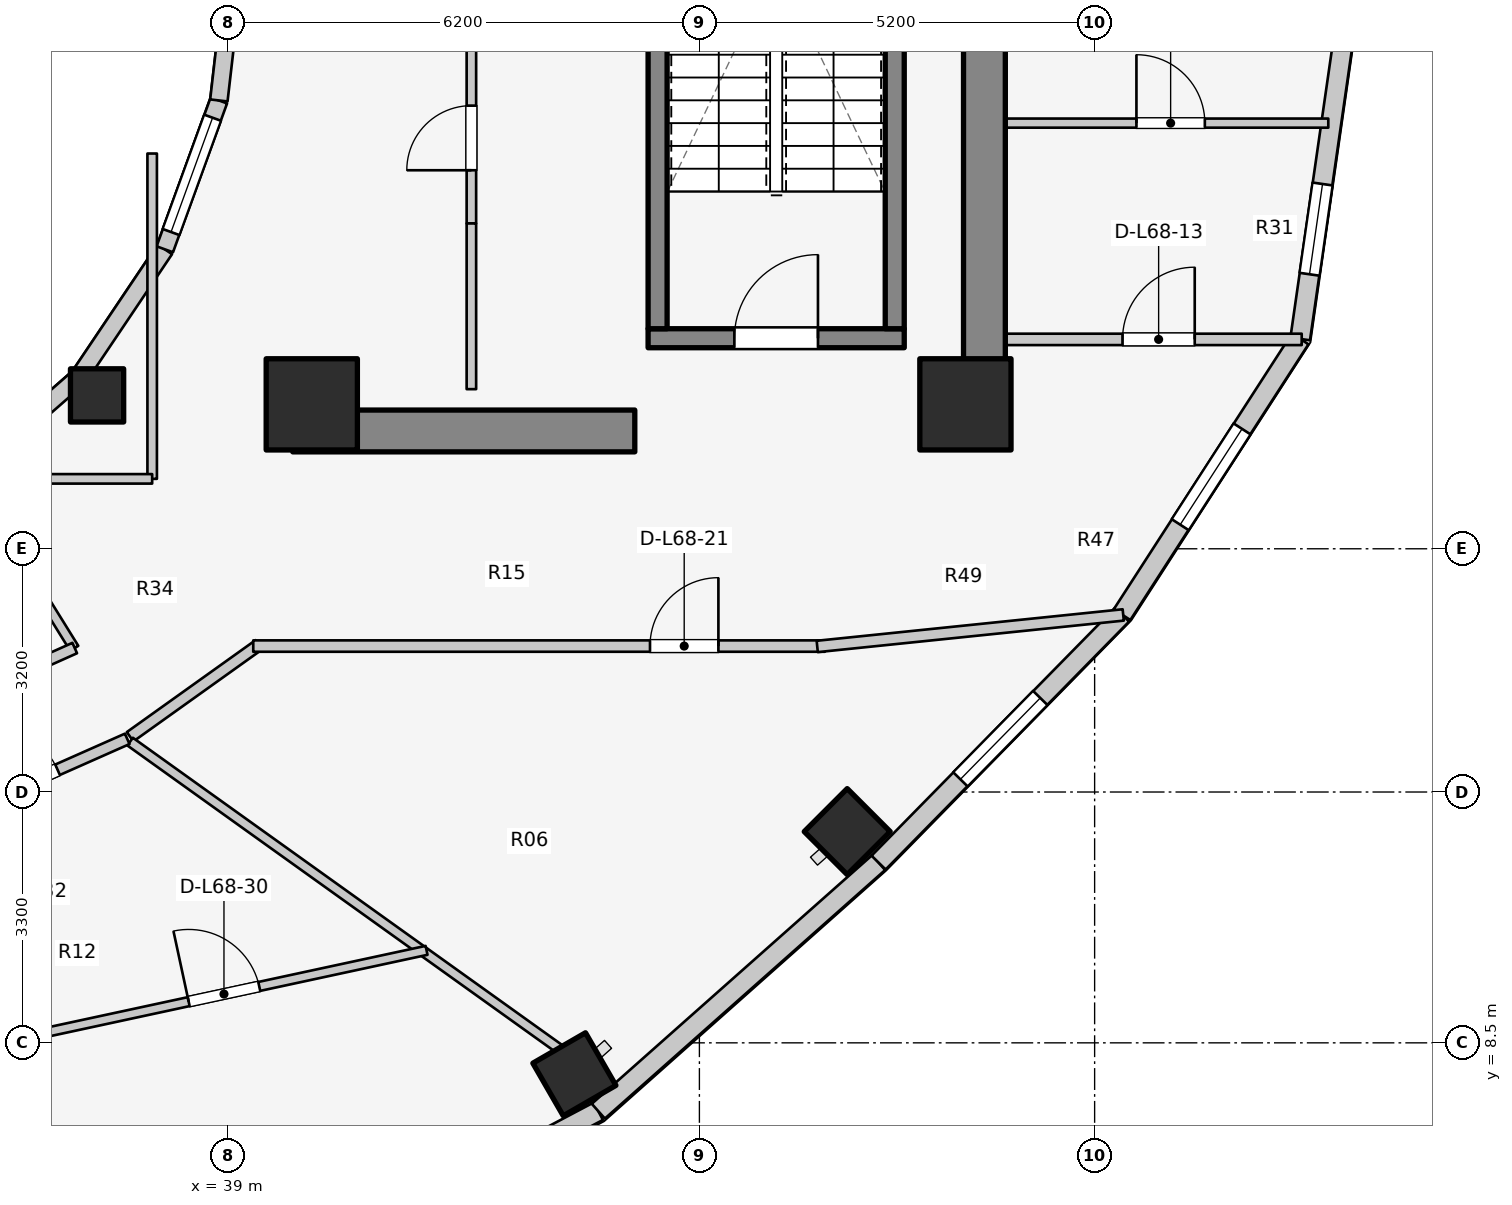
"""IFC4 building model, lengths in metres.
Left out: names, types, materials, properties, quantities, classifications, styles, units other than length and angle.
Written with IfcOpenShell. Run it as: python <this file> out.ifc"""

import sys

from ifc_helpers import new_model, si_unit, direction, frame, frame_2d, origin, origin_2d, place, context, subcontext, project, spatial, rectangle, extrude, element, fill, save


model = new_model("IFC4")
c1 = context("Model", 3, precision=1e-05, world=origin(), true_north=direction((0.0, 1.0)))
c2 = subcontext(c1, "Body", "Model", "MODEL_VIEW")
j1 = project(units=[si_unit("LENGTHUNIT", "METRE"), si_unit("PLANEANGLEUNIT", "RADIAN")], contexts=[c1])
p1 = place(None, origin())
s1 = spatial("IfcSite", under=j1, at=p1, CompositionType="ELEMENT")
p2 = place(p1, origin())
s2 = spatial("IfcBuilding", under=s1, at=p2, CompositionType="ELEMENT")
p3 = place(p2, frame((0.0, 0.0, 223.3)))
s3 = spatial("IfcBuildingStorey", under=s2, at=p3, CompositionType="ELEMENT", Elevation=223.3)
p4 = place(p3, frame((48.95, 17.05, 0.0), z_axis=(0.0, 0.0, 1.0), x_axis=(0.0, 1.0, 0.0)))
e1 = element("IfcWall", 1, at=p4, inside=s3, PredefinedType="SHEAR", context=c2, shape_type="SweptSolid", body=[
    extrude(rectangle(XDim=12.8, YDim=0.55, at=frame_2d((6.4, 0.0))), origin(), (0.0, 0.0, 1.0), 3.1),
])
p5 = place(p3, frame((39.85, 16.55, 0.0), z_axis=(0.0, 0.0, 1.0), x_axis=(1.0, 0.0, 0.0)))
e2 = element("IfcWall", 2, at=p5, inside=s3, PredefinedType="SHEAR", context=c2, shape_type="SweptSolid", body=[
    extrude(rectangle(XDim=4.5, YDim=0.55, at=frame_2d((2.25, 0.0))), origin(), (0.0, 0.0, 1.0), 3.1),
])
p6 = place(p3, frame((44.525, 17.77, 0.0), z_axis=(0.0, 0.0, 1.0), x_axis=(1.0, 0.0, 0.0)))
e3 = element("IfcWall", 3, at=p6, inside=s3, PredefinedType="SOLIDWALL", context=c2, shape_type="SweptSolid", body=[
    extrude(rectangle(XDim=3.37, YDim=0.25, at=frame_2d((1.685, 0.0))), origin(), (0.0, 0.0, 1.0), 3.1),
])
p7 = place(p6, frame((1.135, 0.0, 0.0)))
e4 = element("IfcOpeningElement", 4, at=p7, cuts=e3, PredefinedType="OPENING", context=c2, shape_type="SweptSolid", body=[
    extrude(rectangle(XDim=1.1, YDim=2.1, at=frame_2d((0.55, 1.05))), frame((0.0, 0.135, 0.0), z_axis=(0.0, -1.0, 0.0), x_axis=(1.0, 0.0, 0.0)), (0.0, 0.0, 1.0), 0.27),
])
for number, where, z_axis, x_axis in (
    (5, (44.65, 17.895, 0.0), (0.0, 0.0, 1.0), (0.0, 1.0, 0.0)),
    (6, (47.77, 17.895, 0.0), (0.0, 0.0, 1.0), (0.0, 1.0, 0.0)),
):
    element("IfcWall", number, at=place(p3, frame(where, z_axis=z_axis, x_axis=x_axis)), inside=s3, PredefinedType="SOLIDWALL", context=c2, shape_type="SweptSolid", body=[
        extrude(rectangle(XDim=7.81, YDim=0.25, at=frame_2d((3.905, 0.0))), origin(), (0.0, 0.0, 1.0), 3.1),
    ])
for number, where, z_axis, x_axis in (
    (7, (40.1, 16.9, 0.0), (0.0, 0.0, 1.0), (1.0, 0.0, 0.0)),
    (8, (48.7, 16.9, 0.0), (0.0, 0.0, 1.0), (1.0, 0.0, 0.0)),
):
    element("IfcColumn", number, at=place(p3, frame(where, z_axis=z_axis, x_axis=x_axis)), inside=s3, PredefinedType="COLUMN", context=c2, shape_type="SweptSolid", body=[
        extrude(rectangle(XDim=1.2, YDim=1.2, at=origin_2d()), origin(), (0.0, 0.0, 1.0), 3.1),
    ])
p8 = place(p3, frame((43.555, 8.086, 0.0), z_axis=(0.0, 0.0, 1.0), x_axis=(0.5, -0.866025403784, 0.0)))
e9 = element("IfcColumn", 9, at=p8, inside=s3, PredefinedType="COLUMN", context=c2, shape_type="SweptSolid", body=[
    extrude(rectangle(XDim=0.8, YDim=0.8, at=origin_2d()), origin(), (0.0, 0.0, 1.0), 3.1),
])
p9 = place(p3, frame((37.275, 17.018, 0.0), z_axis=(0.0, 0.0, 1.0), x_axis=(1.0, 0.0, 0.0)))
e10 = element("IfcColumn", 10, at=p9, inside=s3, PredefinedType="COLUMN", context=c2, shape_type="SweptSolid", body=[
    extrude(rectangle(XDim=0.7, YDim=0.7, at=origin_2d()), origin(), (0.0, 0.0, 1.0), 3.1),
])
p10 = place(p3, frame((47.145, 11.279, 0.0), z_axis=(0.0, 0.0, 1.0), x_axis=(0.707106781187, -0.707106781187, 0.0)))
e11 = element("IfcColumn", 11, at=p10, inside=s3, PredefinedType="COLUMN", context=c2, shape_type="SweptSolid", body=[
    extrude(rectangle(XDim=0.8, YDim=0.8, at=origin_2d()), origin(), (0.0, 0.0, 1.0), 3.1),
])
p11 = place(p3, frame((35.56, 15.968, 0.0), z_axis=(0.0, 0.0, 1.0), x_axis=(0.752576694707, 0.658504607869, 0.0)))
e12 = element("IfcWall", 12, at=p11, inside=s3, PredefinedType="STANDARD", context=c2, shape_type="SweptSolid", body=[
    extrude(rectangle(XDim=1.959, YDim=0.23, at=frame_2d((0.98, 0.0))), origin(), (0.0, 0.0, 1.0), 2.16),
])
p12 = place(p3, frame((37.035, 17.258, 0.0), z_axis=(0.0, 0.0, 1.0), x_axis=(0.558197800898, 0.829707909492, 0.0)))
e13 = element("IfcWall", 13, at=p12, inside=s3, PredefinedType="STANDARD", context=c2, shape_type="SweptSolid", body=[
    extrude(rectangle(XDim=2.027, YDim=0.23, at=frame_2d((1.013, 0.0))), origin(), (0.0, 0.0, 1.0), 2.16),
])
p13 = place(p3, frame((38.166, 18.94, 0.0), z_axis=(0.0, 0.0, 1.0), x_axis=(0.341423187295, 0.93990968033, 0.0)))
e14 = element("IfcWall", 14, at=p13, inside=s3, PredefinedType="STANDARD", context=c2, shape_type="SweptSolid", body=[
    extrude(rectangle(XDim=2.084, YDim=0.23, at=frame_2d((1.042, 0.0))), origin(), (0.0, 0.0, 1.0), 2.84),
])
p14 = place(p13, frame((0.242, 0.0, 0.85)))
e15 = element("IfcOpeningElement", 15, at=p14, cuts=e14, PredefinedType="OPENING", context=c2, shape_type="SweptSolid", body=[
    extrude(rectangle(XDim=1.6, YDim=1.65, at=frame_2d((0.8, 0.825))), frame((0.0, 0.125, 0.0), z_axis=(0.0, -1.0, 0.0), x_axis=(1.0, 0.0, 0.0)), (0.0, 0.0, 1.0), 0.25),
])
p15 = place(p3, frame((38.877, 20.898, 0.0), z_axis=(0.0, 0.0, 1.0), x_axis=(0.114711713601, 0.993398823617, 0.0)))
e16 = element("IfcWall", 16, at=p15, inside=s3, PredefinedType="STANDARD", context=c2, shape_type="SweptSolid", body=[
    extrude(rectangle(XDim=2.115, YDim=0.23, at=frame_2d((1.058, 0.0))), origin(), (0.0, 0.0, 1.0), 2.84),
])
p16 = place(p3, frame((39.043, 5.048, 0.0), z_axis=(0.0, 0.0, 1.0), x_axis=(0.884000981341, 0.46748504253, 0.0)))
e17 = element("IfcWall", 17, at=p16, inside=s3, PredefinedType="STANDARD", context=c2, shape_type="SweptSolid", body=[
    extrude(rectangle(XDim=5.46, YDim=0.26, at=frame_2d((2.73, 0.0))), origin(), (0.0, 0.0, 1.0), 2.85),
])
p17 = place(p16, frame((1.53, 0.0, 0.75)))
e18 = element("IfcOpeningElement", 18, at=p17, cuts=e17, PredefinedType="OPENING", context=c2, shape_type="SweptSolid", body=[
    extrude(rectangle(XDim=2.4, YDim=1.7, at=frame_2d((1.2, 0.85))), frame((0.0, 0.14, 0.0), z_axis=(0.0, -1.0, 0.0), x_axis=(1.0, 0.0, 0.0)), (0.0, 0.0, 1.0), 0.28),
])
p18 = place(p3, frame((43.87, 7.601, 0.0), z_axis=(0.0, 0.0, 1.0), x_axis=(0.748165854006, 0.663511759428, 0.0)))
e19 = element("IfcWall", 19, at=p18, inside=s3, PredefinedType="STANDARD", context=c2, shape_type="SweptSolid", body=[
    extrude(rectangle(XDim=4.929, YDim=0.26, at=frame_2d((2.464, 0.0))), origin(), (0.0, 0.0, 1.0), 2.85),
])
p19 = place(p3, frame((47.558, 10.871, 0.0), z_axis=(0.0, 0.0, 1.0), x_axis=(0.700642973333, 0.713512034881, 0.0)))
e20 = element("IfcWall", 20, at=p19, inside=s3, PredefinedType="STANDARD", context=c2, shape_type="SweptSolid", body=[
    extrude(rectangle(XDim=4.572, YDim=0.26, at=frame_2d((2.286, 0.0))), origin(), (0.0, 0.0, 1.0), 2.85),
])
p20 = place(p19, frame((1.536, 0.0, 0.75)))
e21 = element("IfcOpeningElement", 21, at=p20, cuts=e20, PredefinedType="OPENING", context=c2, shape_type="SweptSolid", body=[
    extrude(rectangle(XDim=1.5, YDim=1.6, at=frame_2d((0.75, 0.8))), frame((0.0, 0.14, 0.0), z_axis=(0.0, -1.0, 0.0), x_axis=(1.0, 0.0, 0.0)), (0.0, 0.0, 1.0), 0.28),
])
p21 = place(p3, frame((50.761, 14.133, 0.0), z_axis=(0.0, 0.0, 1.0), x_axis=(0.542641766008, 0.839964233634, 0.0)))
e22 = element("IfcWall", 22, at=p21, inside=s3, PredefinedType="STANDARD", context=c2, shape_type="SweptSolid", body=[
    extrude(rectangle(XDim=4.319, YDim=0.26, at=frame_2d((2.16, 0.0))), origin(), (0.0, 0.0, 1.0), 2.85),
])
p22 = place(p21, frame((1.41, 0.0, 0.75)))
e23 = element("IfcOpeningElement", 23, at=p22, cuts=e22, PredefinedType="OPENING", context=c2, shape_type="SweptSolid", body=[
    extrude(rectangle(XDim=1.5, YDim=1.6, at=frame_2d((0.75, 0.8))), frame((0.0, 0.14, 0.0), z_axis=(0.0, -1.0, 0.0), x_axis=(1.0, 0.0, 0.0)), (0.0, 0.0, 1.0), 0.28),
])
p23 = place(p3, frame((53.105, 17.761, 0.0), z_axis=(0.0, 0.0, 1.0), x_axis=(0.142712754019, 0.989764148593, 0.0)))
e24 = element("IfcWall", 24, at=p23, inside=s3, PredefinedType="STANDARD", context=c2, shape_type="SweptSolid", body=[
    extrude(rectangle(XDim=5.293, YDim=0.26, at=frame_2d((2.646, 0.0))), origin(), (0.0, 0.0, 1.0), 2.85),
])
p24 = place(p23, frame((0.859, 0.0, 0.75)))
e25 = element("IfcOpeningElement", 25, at=p24, cuts=e24, PredefinedType="OPENING", context=c2, shape_type="SweptSolid", body=[
    extrude(rectangle(XDim=1.2, YDim=1.5, at=frame_2d((0.6, 0.75))), frame((0.0, 0.14, 0.0), z_axis=(0.0, -1.0, 0.0), x_axis=(1.0, 0.0, 0.0)), (0.0, 0.0, 1.0), 0.28),
])
p25 = place(p3, frame((42.2, 19.28, 0.0), z_axis=(0.0, 0.0, 1.0), x_axis=(0.0, 1.0, 0.0)))
e26 = element("IfcWall", 26, at=p25, inside=s3, PredefinedType="PARTITIONING", context=c2, shape_type="SweptSolid", body=[
    extrude(rectangle(XDim=2.4, YDim=0.125, at=frame_2d((1.2, 0.0))), origin(), (0.0, 0.0, 1.0), 2.855),
])
p26 = place(p25, frame((0.7, 0.0, 0.0)))
e27 = element("IfcOpeningElement", 27, at=p26, cuts=e26, PredefinedType="OPENING", context=c2, shape_type="SweptSolid", body=[
    extrude(rectangle(XDim=0.85, YDim=2.05, at=frame_2d((0.425, 1.025))), frame((0.0, 0.073, 0.0), z_axis=(0.0, -1.0, 0.0), x_axis=(1.0, 0.0, 0.0)), (0.0, 0.0, 1.0), 0.145),
])
p27 = place(p3, frame((42.2, 17.1, 0.0), z_axis=(0.0, 0.0, 1.0), x_axis=(0.0, 1.0, 0.0)))
e28 = element("IfcWall", 28, at=p27, inside=s3, PredefinedType="PARTITIONING", context=c2, shape_type="SweptSolid", body=[
    extrude(rectangle(XDim=2.18, YDim=0.125, at=frame_2d((1.09, 0.0))), origin(), (0.0, 0.0, 1.0), 2.855),
])
p28 = place(p3, frame((35.55, 15.985, 0.0), z_axis=(0.0, 0.0, 1.0), x_axis=(0.527527080983, -0.849538215049, 0.0)))
e29 = element("IfcWall", 29, at=p28, inside=s3, PredefinedType="PARTITIONING", context=c2, shape_type="SweptSolid", body=[
    extrude(rectangle(XDim=2.701, YDim=0.125, at=frame_2d((1.351, 0.0))), origin(), (0.0, 0.0, 1.0), 2.376),
])
p29 = place(p3, frame((34.573, 12.616, 0.0), z_axis=(0.0, 0.0, 1.0), x_axis=(0.912628408652, 0.408790151203, 0.0)))
e30 = element("IfcWall", 30, at=p29, inside=s3, PredefinedType="PARTITIONING", context=c2, shape_type="SweptSolid", body=[
    extrude(rectangle(XDim=2.638, YDim=0.15, at=frame_2d((1.319, 0.0))), origin(), (0.0, 0.0, 1.0), 2.376),
])
p30 = place(p29, frame((0.844, 0.0, 0.0)))
e31 = element("IfcOpeningElement", 31, at=p30, cuts=e30, PredefinedType="OPENING", context=c2, shape_type="SweptSolid", body=[
    extrude(rectangle(XDim=0.95, YDim=2.1, at=frame_2d((0.475, 1.05))), frame((0.0, 0.085, 0.0), z_axis=(0.0, -1.0, 0.0), x_axis=(1.0, 0.0, 0.0)), (0.0, 0.0, 1.0), 0.17),
])
p31 = place(p3, frame((38.0, 15.92, 0.0), z_axis=(0.0, 0.0, 1.0), x_axis=(0.0, 1.0, 0.0)))
e32 = element("IfcWall", 32, at=p31, inside=s3, PredefinedType="PARTITIONING", context=c2, shape_type="SweptSolid", body=[
    extrude(rectangle(XDim=4.28, YDim=0.125, at=frame_2d((2.14, 0.0))), origin(), (0.0, 0.0, 1.0), 2.232),
])
p32 = place(p3, frame((35.4, 15.92, 0.0), z_axis=(0.0, 0.0, 1.0), x_axis=(1.0, 0.0, 0.0)))
e33 = element("IfcWall", 33, at=p32, inside=s3, PredefinedType="PARTITIONING", context=c2, shape_type="SweptSolid", body=[
    extrude(rectangle(XDim=2.6, YDim=0.125, at=frame_2d((1.3, 0.0))), origin(), (0.0, 0.0, 1.0), 2.232),
])
p33 = place(p3, frame((48.95, 17.755, 0.0), z_axis=(0.0, 0.0, 1.0), x_axis=(1.0, 0.0, 0.0)))
e34 = element("IfcWall", 34, at=p33, inside=s3, PredefinedType="PARTITIONING", context=c2, shape_type="SweptSolid", body=[
    extrude(rectangle(XDim=4.175, YDim=0.15, at=frame_2d((2.087, 0.0))), origin(), (0.0, 0.0, 1.0), 2.855),
])
p34 = place(p33, frame((1.817, 0.0, 0.0)))
e35 = element("IfcOpeningElement", 35, at=p34, cuts=e34, PredefinedType="OPENING", context=c2, shape_type="SweptSolid", body=[
    extrude(rectangle(XDim=0.95, YDim=2.1, at=frame_2d((0.475, 1.05))), frame((0.0, 0.085, 0.0), z_axis=(0.0, -1.0, 0.0), x_axis=(1.0, 0.0, 0.0)), (0.0, 0.0, 1.0), 0.17),
])
p35 = place(p3, frame((48.95, 20.6, 0.0), z_axis=(0.0, 0.0, 1.0), x_axis=(1.0, 0.0, 0.0)))
e36 = element("IfcWall", 36, at=p35, inside=s3, PredefinedType="MOVABLE", context=c2, shape_type="SweptSolid", body=[
    extrude(rectangle(XDim=4.524, YDim=0.12, at=frame_2d((2.262, 0.0))), origin(), (0.0, 0.0, 1.0), 2.855),
])
p36 = place(p35, frame((2.0, 0.0, 0.0)))
e37 = element("IfcOpeningElement", 37, at=p36, cuts=e36, PredefinedType="OPENING", context=c2, shape_type="SweptSolid", body=[
    extrude(rectangle(XDim=0.9, YDim=2.1, at=frame_2d((0.45, 1.05))), frame((0.0, 0.07, 0.0), z_axis=(0.0, -1.0, 0.0), x_axis=(1.0, 0.0, 0.0)), (0.0, 0.0, 1.0), 0.14),
])
p37 = place(p3, frame((37.71, 12.527, 0.0), z_axis=(0.0, 0.0, 1.0), x_axis=(0.813780999276, 0.581171648669, 0.0)))
e38 = element("IfcWall", 38, at=p37, inside=s3, PredefinedType="PARTITIONING", context=c2, shape_type="SweptSolid", body=[
    extrude(rectangle(XDim=2.082, YDim=0.15, at=frame_2d((1.041, 0.0))), origin(), (0.0, 0.0, 1.0), 2.376),
])
p38 = place(p3, frame((39.33, 13.72, 0.0), z_axis=(0.0, 0.0, 1.0), x_axis=(1.0, 0.0, 0.0)))
e39 = element("IfcWall", 39, at=p38, inside=s3, PredefinedType="PARTITIONING", context=c2, shape_type="SweptSolid", body=[
    extrude(rectangle(XDim=7.52, YDim=0.15, at=frame_2d((3.76, 0.0))), origin(), (0.0, 0.0, 1.0), 2.376),
])
p39 = place(p38, frame((5.22, 0.0, 0.0)))
e40 = element("IfcOpeningElement", 40, at=p39, cuts=e39, PredefinedType="OPENING", context=c2, shape_type="SweptSolid", body=[
    extrude(rectangle(XDim=0.9, YDim=2.1, at=frame_2d((0.45, 1.05))), frame((0.0, 0.085, 0.0), z_axis=(0.0, -1.0, 0.0), x_axis=(1.0, 0.0, 0.0)), (0.0, 0.0, 1.0), 0.17),
])
p40 = place(p3, frame((46.75, 13.715, 0.0), z_axis=(0.0, 0.0, 1.0), x_axis=(0.994734711466, 0.102483431859, 0.0)))
e41 = element("IfcWall", 41, at=p40, inside=s3, PredefinedType="PARTITIONING", context=c2, shape_type="SweptSolid", body=[
    extrude(rectangle(XDim=4.047, YDim=0.15, at=frame_2d((2.024, 0.0))), origin(), (0.0, 0.0, 1.0), 2.22),
])
p41 = place(p3, frame((37.71, 12.463, 0.0), z_axis=(0.0, 0.0, 1.0), x_axis=(0.813163816543, -0.582034885093, 0.0)))
e42 = element("IfcWall", 42, at=p41, inside=s3, PredefinedType="PARTITIONING", context=c2, shape_type="SweptSolid", body=[
    extrude(rectangle(XDim=6.955, YDim=0.125, at=frame_2d((3.477, 0.0))), origin(), (0.0, 0.0, 1.0), 2.376),
])
p42 = place(p3, frame((36.279, 8.567, 0.0), z_axis=(0.0, 0.0, 1.0), x_axis=(0.977534972695, 0.210773283785, 0.0)))
e43 = element("IfcWall", 43, at=p42, inside=s3, PredefinedType="MOVABLE", context=c2, shape_type="SweptSolid", body=[
    extrude(rectangle(XDim=5.453, YDim=0.12, at=frame_2d((2.727, 0.0))), origin(), (0.0, 0.0, 1.0), 2.376),
])
p43 = place(p42, frame((2.252, 0.0, 0.0)))
e44 = element("IfcOpeningElement", 44, at=p43, cuts=e43, PredefinedType="OPENING", context=c2, shape_type="SweptSolid", body=[
    extrude(rectangle(XDim=0.95, YDim=2.1, at=frame_2d((0.475, 1.05))), frame((0.0, 0.07, 0.0), z_axis=(0.0, -1.0, 0.0), x_axis=(1.0, 0.0, 0.0)), (0.0, 0.0, 1.0), 0.14),
])
p44 = place(p3, frame((34.925, 11.281, 0.0), z_axis=(0.0, 0.0, 1.0), x_axis=(0.914139569865, 0.405399613724, 0.0)))
e45 = element("IfcWall", 45, at=p44, inside=s3, PredefinedType="PARTITIONING", context=c2, shape_type="SweptSolid", body=[
    extrude(rectangle(XDim=3.005, YDim=0.15, at=frame_2d((1.502, 0.0))), origin(), (0.0, 0.0, 1.0), 2.376),
])
p45 = place(p44, frame((1.002, 0.0, 0.0)))
e46 = element("IfcOpeningElement", 46, at=p45, cuts=e45, PredefinedType="OPENING", context=c2, shape_type="SweptSolid", body=[
    extrude(rectangle(XDim=1.0, YDim=2.1, at=frame_2d((0.5, 1.05))), frame((0.0, 0.085, 0.0), z_axis=(0.0, -1.0, 0.0), x_axis=(1.0, 0.0, 0.0)), (0.0, 0.0, 1.0), 0.17),
])
p46 = place(p14, origin())
e47 = element("IfcWindow", 47, at=p46, inside=s3, PartitioningType="SINGLE_PANEL", PredefinedType="WINDOW", context=c2, shape_type="SweptSolid", body=[
    extrude(rectangle(XDim=1.6, YDim=1.65, at=frame_2d((0.8, 0.825))), frame((0.0, 0.03, 0.0), z_axis=(0.0, -1.0, 0.0), x_axis=(1.0, 0.0, 0.0)), (0.0, 0.0, 1.0), 0.06),
])
fill(e15, e47)
p47 = place(p20, origin())
e48 = element("IfcWindow", 48, at=p47, inside=s3, PartitioningType="SINGLE_PANEL", PredefinedType="WINDOW", context=c2, shape_type="SweptSolid", body=[
    extrude(rectangle(XDim=1.5, YDim=1.6, at=frame_2d((0.75, 0.8))), frame((0.0, 0.03, 0.0), z_axis=(0.0, -1.0, 0.0), x_axis=(1.0, 0.0, 0.0)), (0.0, 0.0, 1.0), 0.06),
])
fill(e21, e48)
p48 = place(p22, origin())
e49 = element("IfcWindow", 49, at=p48, inside=s3, PartitioningType="SINGLE_PANEL", PredefinedType="WINDOW", context=c2, shape_type="SweptSolid", body=[
    extrude(rectangle(XDim=1.5, YDim=1.6, at=frame_2d((0.75, 0.8))), frame((0.0, 0.03, 0.0), z_axis=(0.0, -1.0, 0.0), x_axis=(1.0, 0.0, 0.0)), (0.0, 0.0, 1.0), 0.06),
])
fill(e23, e49)
p49 = place(p24, origin())
e50 = element("IfcWindow", 50, at=p49, inside=s3, PartitioningType="SINGLE_PANEL", PredefinedType="WINDOW", context=c2, shape_type="SweptSolid", body=[
    extrude(rectangle(XDim=1.2, YDim=1.5, at=frame_2d((0.6, 0.75))), frame((0.0, 0.03, 0.0), z_axis=(0.0, -1.0, 0.0), x_axis=(1.0, 0.0, 0.0)), (0.0, 0.0, 1.0), 0.06),
])
fill(e25, e50)
p50 = place(p7, origin())
e51 = element("IfcDoor", 51, at=p50, inside=s3, OperationType="SINGLE_SWING_RIGHT", PredefinedType="DOOR", context=c2, shape_type="SweptSolid", body=[
    extrude(rectangle(XDim=1.1, YDim=2.1, at=frame_2d((0.55, 1.05))), frame((0.0, 0.025, 0.0), z_axis=(0.0, -1.0, 0.0), x_axis=(1.0, 0.0, 0.0)), (0.0, 0.0, 1.0), 0.05),
])
fill(e4, e51)
p51 = place(p26, origin())
e52 = element("IfcDoor", 52, at=p51, inside=s3, OperationType="SINGLE_SWING_LEFT", PredefinedType="DOOR", context=c2, shape_type="SweptSolid", body=[
    extrude(rectangle(XDim=0.85, YDim=2.05, at=frame_2d((0.425, 1.025))), frame((0.0, 0.025, 0.0), z_axis=(0.0, -1.0, 0.0), x_axis=(1.0, 0.0, 0.0)), (0.0, 0.0, 1.0), 0.05),
])
fill(e27, e52)
p52 = place(p34, origin())
e53 = element("IfcDoor", 53, at=p52, inside=s3, OperationType="SINGLE_SWING_RIGHT", PredefinedType="DOOR", context=c2, shape_type="SweptSolid", body=[
    extrude(rectangle(XDim=0.95, YDim=2.1, at=frame_2d((0.475, 1.05))), frame((0.0, 0.025, 0.0), z_axis=(0.0, -1.0, 0.0), x_axis=(1.0, 0.0, 0.0)), (0.0, 0.0, 1.0), 0.05),
])
fill(e35, e53)
p53 = place(p36, origin())
e54 = element("IfcDoor", 54, at=p53, inside=s3, OperationType="SINGLE_SWING_LEFT", PredefinedType="DOOR", context=c2, shape_type="SweptSolid", body=[
    extrude(rectangle(XDim=0.9, YDim=2.1, at=frame_2d((0.45, 1.05))), frame((0.0, 0.025, 0.0), z_axis=(0.0, -1.0, 0.0), x_axis=(1.0, 0.0, 0.0)), (0.0, 0.0, 1.0), 0.05),
])
fill(e37, e54)
p54 = place(p39, origin())
e55 = element("IfcDoor", 55, at=p54, inside=s3, OperationType="SINGLE_SWING_RIGHT", PredefinedType="DOOR", context=c2, shape_type="SweptSolid", body=[
    extrude(rectangle(XDim=0.9, YDim=2.1, at=frame_2d((0.45, 1.05))), frame((0.0, 0.025, 0.0), z_axis=(0.0, -1.0, 0.0), x_axis=(1.0, 0.0, 0.0)), (0.0, 0.0, 1.0), 0.05),
])
fill(e40, e55)
p55 = place(p43, origin())
e56 = element("IfcDoor", 56, at=p55, inside=s3, OperationType="SINGLE_SWING_LEFT", PredefinedType="DOOR", context=c2, shape_type="SweptSolid", body=[
    extrude(rectangle(XDim=0.95, YDim=2.1, at=frame_2d((0.475, 1.05))), frame((0.0, 0.025, 0.0), z_axis=(0.0, -1.0, 0.0), x_axis=(1.0, 0.0, 0.0)), (0.0, 0.0, 1.0), 0.05),
])
fill(e44, e56)
p56 = place(p45, origin())
e57 = element("IfcDoor", 57, at=p56, inside=s3, OperationType="SINGLE_SWING_LEFT", PredefinedType="DOOR", context=c2, shape_type="SweptSolid", body=[
    extrude(rectangle(XDim=1.0, YDim=2.1, at=frame_2d((0.5, 1.05))), frame((0.0, 0.025, 0.0), z_axis=(0.0, -1.0, 0.0), x_axis=(1.0, 0.0, 0.0)), (0.0, 0.0, 1.0), 0.05),
])
fill(e46, e57)
save(model, sys.argv[1])
